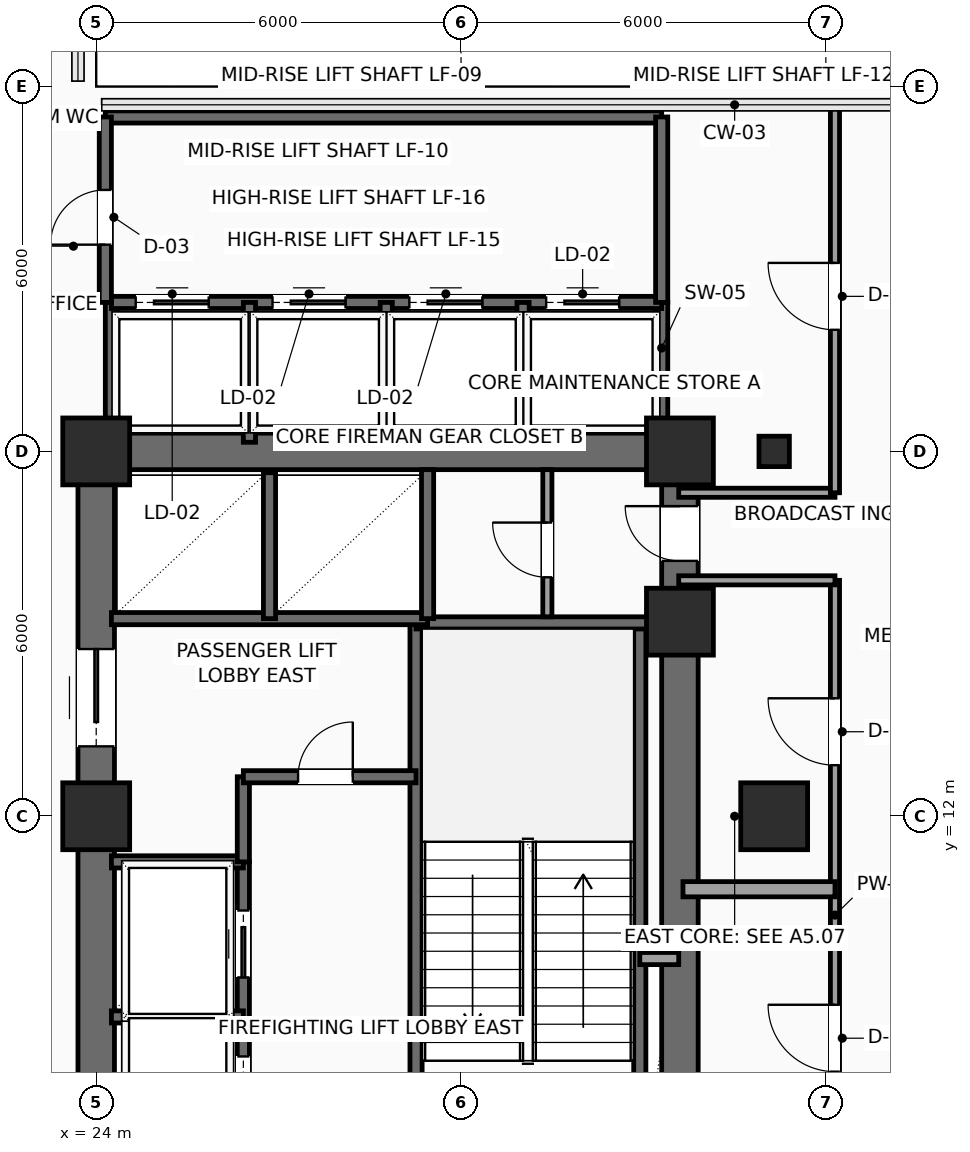
"""IFC4 building model, lengths in metres.
Left out: names, types, materials, properties, quantities, classifications, styles, units other than length and angle.
Written with IfcOpenShell. Run it as: python <this file> out.ifc"""

import sys

from ifc_helpers import new_model, si_unit, direction, frame, frame_2d, origin, origin_2d, place, context, subcontext, project, spatial, rectangle, hollow_rectangle, extrude, element, fill, save


model = new_model("IFC4")
c1 = context("Model", 3, precision=1e-05, world=origin(), true_north=direction((0.0, 1.0)))
c2 = subcontext(c1, "Body", "Model", "MODEL_VIEW")
j1 = project(units=[si_unit("LENGTHUNIT", "METRE"), si_unit("PLANEANGLEUNIT", "RADIAN")], contexts=[c1])
p1 = place(None, origin())
s1 = spatial("IfcSite", under=j1, at=p1, CompositionType="ELEMENT")
p2 = place(p1, origin())
s2 = spatial("IfcBuilding", under=s1, at=p2, CompositionType="ELEMENT")
p3 = place(p2, frame((0.0, 0.0, 130.65)))
s3 = spatial("IfcBuildingStorey", under=s2, at=p3, CompositionType="ELEMENT", Elevation=130.65)
for number, where, z_axis, x_axis in (
    (1, (24.0, 12.0, 0.0), (0.0, 0.0, 1.0), (1.0, 0.0, 0.0)),
    (2, (24.0, 18.0, 0.0), (0.0, 0.0, 1.0), (1.0, 0.0, 0.0)),
    (3, (33.6, 15.2, 0.0), (0.0, 0.0, 1.0), (1.0, 0.0, 0.0)),
    (4, (33.6, 18.0, 0.0), (0.0, 0.0, 1.0), (1.0, 0.0, 0.0)),
    (5, (35.15, 12.0, 0.0), (0.0, 0.0, 1.0), (1.0, 0.0, 0.0)),
):
    element("IfcColumn", number, at=place(p3, frame(where, z_axis=z_axis, x_axis=x_axis)), inside=s3, PredefinedType="COLUMN", context=c2, shape_type="SweptSolid", body=[
        extrude(rectangle(XDim=1.1, YDim=1.1, at=origin_2d()), origin(), (0.0, 0.0, 1.0), 3.75),
    ])
p4 = place(p3, frame((35.15, 18.0, 0.0), z_axis=(0.0, 0.0, 1.0), x_axis=(1.0, 0.0, 0.0)))
e6 = element("IfcColumn", 6, at=p4, inside=s3, PredefinedType="COLUMN", context=c2, shape_type="SweptSolid", body=[
    extrude(hollow_rectangle(XDim=0.5, YDim=0.5, WallThickness=0.025, InnerFilletRadius=0.025, OuterFilletRadius=0.04, at=origin_2d()), origin(), (0.0, 0.0, 1.0), 3.75),
])
p5 = place(p3, frame((24.0, 18.0, 0.0), z_axis=(0.0, 0.0, 1.0), x_axis=(1.0, 0.0, 0.0)))
e7 = element("IfcWall", 7, at=p5, inside=s3, PredefinedType="SHEAR", context=c2, shape_type="SweptSolid", body=[
    extrude(rectangle(XDim=9.6, YDim=0.6, at=frame_2d((4.8, 0.0))), origin(), (0.0, 0.0, 1.0), 3.525),
])
p6 = place(p3, frame((24.0, 6.0, 0.0), z_axis=(0.0, 0.0, 1.0), x_axis=(0.0, 1.0, 0.0)))
e8 = element("IfcWall", 8, at=p6, inside=s3, PredefinedType="SHEAR", context=c2, shape_type="SweptSolid", body=[
    extrude(rectangle(XDim=12.0, YDim=0.6, at=frame_2d((6.0, 0.0))), origin(), (0.0, 0.0, 1.0), 3.525),
])
p7 = place(p6, frame((7.15, 0.0, 0.0)))
e9 = element("IfcOpeningElement", 9, at=p7, cuts=e8, PredefinedType="OPENING", context=c2, shape_type="SweptSolid", body=[
    extrude(rectangle(XDim=1.6, YDim=2.3, at=frame_2d((0.8, 1.15))), frame((0.0, 0.31, 0.0), z_axis=(0.0, -1.0, 0.0), x_axis=(1.0, 0.0, 0.0)), (0.0, 0.0, 1.0), 0.62),
])
p8 = place(p3, frame((33.6, 6.0, 0.0), z_axis=(0.0, 0.0, 1.0), x_axis=(0.0, 1.0, 0.0)))
e10 = element("IfcWall", 10, at=p8, inside=s3, PredefinedType="SHEAR", context=c2, shape_type="SweptSolid", body=[
    extrude(rectangle(XDim=12.0, YDim=0.6, at=frame_2d((6.0, 0.0))), origin(), (0.0, 0.0, 1.0), 3.525),
])
p9 = place(p8, frame((10.2, 0.0, 0.0)))
e11 = element("IfcOpeningElement", 11, at=p9, cuts=e10, PredefinedType="OPENING", context=c2, shape_type="SweptSolid", body=[
    extrude(rectangle(XDim=0.9, YDim=2.15, at=frame_2d((0.45, 1.075))), frame((0.0, 0.31, 0.0), z_axis=(0.0, -1.0, 0.0), x_axis=(1.0, 0.0, 0.0)), (0.0, 0.0, 1.0), 0.62),
])
p10 = place(p3, frame((29.26, 6.3, 0.0), z_axis=(0.0, 0.0, 1.0), x_axis=(0.0, 1.0, 0.0)))
e12 = element("IfcWall", 12, at=p10, inside=s3, PredefinedType="SHEAR", context=c2, shape_type="SweptSolid", body=[
    extrude(rectangle(XDim=8.88, YDim=0.2, at=frame_2d((4.44, 0.0))), origin(), (0.0, 0.0, 1.0), 3.525),
])
p11 = place(p10, frame((0.35, 0.0, 0.0)))
e13 = element("IfcOpeningElement", 13, at=p11, cuts=e12, PredefinedType="OPENING", context=c2, shape_type="SweptSolid", body=[
    extrude(rectangle(XDim=1.1, YDim=2.2, at=frame_2d((0.55, 1.1))), frame((0.0, 0.11, 0.0), z_axis=(0.0, -1.0, 0.0), x_axis=(1.0, 0.0, 0.0)), (0.0, 0.0, 1.0), 0.22),
])
p12 = place(p3, frame((32.94, 6.3, 0.0), z_axis=(0.0, 0.0, 1.0), x_axis=(0.0, 1.0, 0.0)))
e14 = element("IfcWall", 14, at=p12, inside=s3, PredefinedType="SHEAR", context=c2, shape_type="SweptSolid", body=[
    extrude(rectangle(XDim=8.88, YDim=0.2, at=frame_2d((4.44, 0.0))), origin(), (0.0, 0.0, 1.0), 3.525),
])
p13 = place(p3, frame((29.26, 15.18, 0.0), z_axis=(0.0, 0.0, 1.0), x_axis=(1.0, 0.0, 0.0)))
e15 = element("IfcWall", 15, at=p13, inside=s3, PredefinedType="SHEAR", context=c2, shape_type="SweptSolid", body=[
    extrude(rectangle(XDim=4.04, YDim=0.2, at=frame_2d((2.02, 0.0))), origin(), (0.0, 0.0, 1.0), 3.525),
])
p14 = place(p3, frame((26.42, 6.3, 0.0), z_axis=(0.0, 0.0, 1.0), x_axis=(0.0, 1.0, 0.0)))
e16 = element("IfcWall", 16, at=p14, inside=s3, PredefinedType="SHEAR", context=c2, shape_type="SweptSolid", body=[
    extrude(rectangle(XDim=4.95, YDim=0.2, at=frame_2d((2.475, 0.0))), origin(), (0.0, 0.0, 1.0), 3.525),
])
p15 = place(p14, frame((0.65, 0.0, 0.0)))
e17 = element("IfcOpeningElement", 17, at=p15, cuts=e16, PredefinedType="OPENING", context=c2, shape_type="SweptSolid", body=[
    extrude(rectangle(XDim=1.1, YDim=2.2, at=frame_2d((0.55, 1.1))), frame((0.0, 0.11, 0.0), z_axis=(0.0, -1.0, 0.0), x_axis=(1.0, 0.0, 0.0)), (0.0, 0.0, 1.0), 0.22),
])
p16 = place(p14, frame((3.05, 0.0, 0.0)))
e18 = element("IfcOpeningElement", 18, at=p16, cuts=e16, PredefinedType="OPENING", context=c2, shape_type="SweptSolid", body=[
    extrude(rectangle(XDim=1.1, YDim=2.2, at=frame_2d((0.55, 1.1))), frame((0.0, 0.11, 0.0), z_axis=(0.0, -1.0, 0.0), x_axis=(1.0, 0.0, 0.0)), (0.0, 0.0, 1.0), 0.22),
])
for number, where, z_axis, x_axis in (
    (19, (24.25, 8.7, 0.0), (0.0, 0.0, 1.0), (1.0, 0.0, 0.0)),
    (20, (24.25, 11.25, 0.0), (0.0, 0.0, 1.0), (1.0, 0.0, 0.0)),
):
    element("IfcWall", number, at=place(p3, frame(where, z_axis=z_axis, x_axis=x_axis)), inside=s3, PredefinedType="SHEAR", context=c2, shape_type="SweptSolid", body=[
        extrude(rectangle(XDim=2.17, YDim=0.2, at=frame_2d((1.085, 0.0))), origin(), (0.0, 0.0, 1.0), 3.525),
    ])
p17 = place(p3, frame((26.42, 11.25, 0.0), z_axis=(0.0, 0.0, 1.0), x_axis=(0.0, 1.0, 0.0)))
e21 = element("IfcWall", 21, at=p17, inside=s3, PredefinedType="SHEAR", context=c2, shape_type="SweptSolid", body=[
    extrude(rectangle(XDim=1.4, YDim=0.2, at=frame_2d((0.7, 0.0))), origin(), (0.0, 0.0, 1.0), 3.525),
])
p18 = place(p3, frame((26.42, 12.65, 0.0), z_axis=(0.0, 0.0, 1.0), x_axis=(1.0, 0.0, 0.0)))
e22 = element("IfcWall", 22, at=p18, inside=s3, PredefinedType="SHEAR", context=c2, shape_type="SweptSolid", body=[
    extrude(rectangle(XDim=2.84, YDim=0.2, at=frame_2d((1.42, 0.0))), origin(), (0.0, 0.0, 1.0), 3.525),
])
p19 = place(p18, frame((0.9, 0.0, 0.0)))
e23 = element("IfcOpeningElement", 23, at=p19, cuts=e22, PredefinedType="OPENING", context=c2, shape_type="SweptSolid", body=[
    extrude(rectangle(XDim=0.9, YDim=2.15, at=frame_2d((0.45, 1.075))), frame((0.0, 0.11, 0.0), z_axis=(0.0, -1.0, 0.0), x_axis=(1.0, 0.0, 0.0)), (0.0, 0.0, 1.0), 0.22),
])
p20 = place(p3, frame((32.94, 9.66, 0.0), z_axis=(0.0, 0.0, 1.0), x_axis=(1.0, 0.0, 0.0)))
e24 = element("IfcWall", 24, at=p20, inside=s3, PredefinedType="SOLIDWALL", context=c2, shape_type="SweptSolid", body=[
    extrude(rectangle(XDim=0.64, YDim=0.2, at=frame_2d((0.32, 0.0))), origin(), (0.0, 0.0, 1.0), 3.525),
])
p21 = place(p3, frame((24.25, 15.25, 0.0), z_axis=(0.0, 0.0, 1.0), x_axis=(1.0, 0.0, 0.0)))
e25 = element("IfcWall", 25, at=p21, inside=s3, PredefinedType="SHEAR", context=c2, shape_type="SweptSolid", body=[
    extrude(rectangle(XDim=5.2, YDim=0.2, at=frame_2d((2.6, 0.0))), origin(), (0.0, 0.0, 1.0), 3.525),
])
p22 = place(p3, frame((26.85, 15.25, 0.0), z_axis=(0.0, 0.0, 1.0), x_axis=(0.0, 1.0, 0.0)))
e26 = element("IfcWall", 26, at=p22, inside=s3, PredefinedType="SHEAR", context=c2, shape_type="SweptSolid", body=[
    extrude(rectangle(XDim=2.4, YDim=0.2, at=frame_2d((1.2, 0.0))), origin(), (0.0, 0.0, 1.0), 3.525),
])
p23 = place(p3, frame((29.45, 15.25, 0.0), z_axis=(0.0, 0.0, 1.0), x_axis=(0.0, 1.0, 0.0)))
e27 = element("IfcWall", 27, at=p23, inside=s3, PredefinedType="SHEAR", context=c2, shape_type="SweptSolid", body=[
    extrude(rectangle(XDim=2.45, YDim=0.2, at=frame_2d((1.225, 0.0))), origin(), (0.0, 0.0, 1.0), 3.525),
])
p24 = place(p3, frame((31.42, 15.28, 0.0), z_axis=(0.0, 0.0, 1.0), x_axis=(0.0, 1.0, 0.0)))
e28 = element("IfcWall", 28, at=p24, inside=s3, PredefinedType="PARTITIONING", context=c2, shape_type="SweptSolid", body=[
    extrude(rectangle(XDim=2.42, YDim=0.15, at=frame_2d((1.21, 0.0))), origin(), (0.0, 0.0, 1.0), 3.525),
])
p25 = place(p24, frame((0.65, 0.0, 0.0)))
e29 = element("IfcOpeningElement", 29, at=p25, cuts=e28, PredefinedType="OPENING", context=c2, shape_type="SweptSolid", body=[
    extrude(rectangle(XDim=0.9, YDim=2.15, at=frame_2d((0.45, 1.075))), frame((0.0, 0.085, 0.0), z_axis=(0.0, -1.0, 0.0), x_axis=(1.0, 0.0, 0.0)), (0.0, 0.0, 1.0), 0.17),
])
for number, where, z_axis, x_axis in (
    (30, (33.3, 18.1, 0.0), (0.0, 0.0, 1.0), (0.0, 1.0, 0.0)),
    (31, (24.25, 18.1, 0.0), (0.0, 0.0, 1.0), (0.0, 1.0, 0.0)),
):
    element("IfcWall", number, at=place(p3, frame(where, z_axis=z_axis, x_axis=x_axis)), inside=s3, PredefinedType="SHEAR", context=c2, shape_type="SweptSolid", body=[
        extrude(rectangle(XDim=2.35, YDim=0.2, at=frame_2d((1.175, 0.0))), origin(), (0.0, 0.0, 1.0), 3.525),
    ])
p26 = place(p3, frame((24.25, 20.45, 0.0), z_axis=(0.0, 0.0, 1.0), x_axis=(1.0, 0.0, 0.0)))
e32 = element("IfcWall", 32, at=p26, inside=s3, PredefinedType="SHEAR", context=c2, shape_type="SweptSolid", body=[
    extrude(rectangle(XDim=9.05, YDim=0.2, at=frame_2d((4.525, 0.0))), origin(), (0.0, 0.0, 1.0), 3.525),
])
p27 = place(p26, frame((0.4, 0.0, 0.0)))
e33 = element("IfcOpeningElement", 33, at=p27, cuts=e32, PredefinedType="OPENING", context=c2, shape_type="SweptSolid", body=[
    extrude(rectangle(XDim=1.2, YDim=2.2, at=frame_2d((0.6, 1.1))), frame((0.0, 0.11, 0.0), z_axis=(0.0, -1.0, 0.0), x_axis=(1.0, 0.0, 0.0)), (0.0, 0.0, 1.0), 0.22),
])
p28 = place(p26, frame((2.65, 0.0, 0.0)))
e34 = element("IfcOpeningElement", 34, at=p28, cuts=e32, PredefinedType="OPENING", context=c2, shape_type="SweptSolid", body=[
    extrude(rectangle(XDim=1.2, YDim=2.2, at=frame_2d((0.6, 1.1))), frame((0.0, 0.11, 0.0), z_axis=(0.0, -1.0, 0.0), x_axis=(1.0, 0.0, 0.0)), (0.0, 0.0, 1.0), 0.22),
])
p29 = place(p26, frame((4.9, 0.0, 0.0)))
e35 = element("IfcOpeningElement", 35, at=p29, cuts=e32, PredefinedType="OPENING", context=c2, shape_type="SweptSolid", body=[
    extrude(rectangle(XDim=1.2, YDim=2.2, at=frame_2d((0.6, 1.1))), frame((0.0, 0.11, 0.0), z_axis=(0.0, -1.0, 0.0), x_axis=(1.0, 0.0, 0.0)), (0.0, 0.0, 1.0), 0.22),
])
p30 = place(p26, frame((7.15, 0.0, 0.0)))
e36 = element("IfcOpeningElement", 36, at=p30, cuts=e32, PredefinedType="OPENING", context=c2, shape_type="SweptSolid", body=[
    extrude(rectangle(XDim=1.2, YDim=2.2, at=frame_2d((0.6, 1.1))), frame((0.0, 0.11, 0.0), z_axis=(0.0, -1.0, 0.0), x_axis=(1.0, 0.0, 0.0)), (0.0, 0.0, 1.0), 0.22),
])
for number, where, z_axis, x_axis in (
    (37, (26.52, 18.15, 0.0), (0.0, 0.0, 1.0), (0.0, 1.0, 0.0)),
    (38, (28.77, 18.15, 0.0), (0.0, 0.0, 1.0), (0.0, 1.0, 0.0)),
    (39, (31.02, 18.15, 0.0), (0.0, 0.0, 1.0), (0.0, 1.0, 0.0)),
):
    element("IfcWall", number, at=place(p3, frame(where, z_axis=z_axis, x_axis=x_axis)), inside=s3, PredefinedType="SHEAR", context=c2, shape_type="SweptSolid", body=[
        extrude(rectangle(XDim=2.3, YDim=0.2, at=frame_2d((1.15, 0.0))), origin(), (0.0, 0.0, 1.0), 3.525),
    ])
p31 = place(p3, frame((24.15, 23.5, 0.0), z_axis=(0.0, 0.0, 1.0), x_axis=(1.0, 0.0, 0.0)))
e40 = element("IfcWall", 40, at=p31, inside=s3, PredefinedType="SHEAR", context=c2, shape_type="SweptSolid", body=[
    extrude(rectangle(XDim=9.15, YDim=0.2, at=frame_2d((4.575, 0.0))), origin(), (0.0, 0.0, 1.0), 3.525),
])
p32 = place(p3, frame((33.3, 20.45, 0.0), z_axis=(0.0, 0.0, 1.0), x_axis=(0.0, 1.0, 0.0)))
e41 = element("IfcWall", 41, at=p32, inside=s3, PredefinedType="SHEAR", context=c2, shape_type="SweptSolid", body=[
    extrude(rectangle(XDim=3.05, YDim=0.2, at=frame_2d((1.525, 0.0))), origin(), (0.0, 0.0, 1.0), 3.525),
])
p33 = place(p3, frame((24.15, 20.45, 0.0), z_axis=(0.0, 0.0, 1.0), x_axis=(0.0, 1.0, 0.0)))
e42 = element("IfcWall", 42, at=p33, inside=s3, PredefinedType="SHEAR", context=c2, shape_type="SweptSolid", body=[
    extrude(rectangle(XDim=3.05, YDim=0.2, at=frame_2d((1.525, 0.0))), origin(), (0.0, 0.0, 1.0), 3.525),
])
p34 = place(p33, frame((0.95, 0.0, 0.0)))
e43 = element("IfcOpeningElement", 43, at=p34, cuts=e42, PredefinedType="OPENING", context=c2, shape_type="SweptSolid", body=[
    extrude(rectangle(XDim=0.9, YDim=2.15, at=frame_2d((0.45, 1.075))), frame((0.0, 0.11, 0.0), z_axis=(0.0, -1.0, 0.0), x_axis=(1.0, 0.0, 0.0)), (0.0, 0.0, 1.0), 0.22),
])
p35 = place(p3, frame((36.15, 5.8, 0.0), z_axis=(0.0, 0.0, 1.0), x_axis=(0.0, 1.0, 0.0)))
e44 = element("IfcWall", 44, at=p35, inside=s3, PredefinedType="PARTITIONING", context=c2, shape_type="SweptSolid", body=[
    extrude(rectangle(XDim=10.08, YDim=0.15, at=frame_2d((5.04, 0.0))), origin(), (0.0, 0.0, 1.0), 3.525),
])
p36 = place(p35, frame((2.0, 0.0, 0.0)))
e45 = element("IfcOpeningElement", 45, at=p36, cuts=e44, PredefinedType="OPENING", context=c2, shape_type="SweptSolid", body=[
    extrude(rectangle(XDim=1.1, YDim=2.25, at=frame_2d((0.55, 1.125))), frame((0.0, 0.085, 0.0), z_axis=(0.0, -1.0, 0.0), x_axis=(1.0, 0.0, 0.0)), (0.0, 0.0, 1.0), 0.17),
])
p37 = place(p35, frame((7.04, 0.0, 0.0)))
e46 = element("IfcOpeningElement", 46, at=p37, cuts=e44, PredefinedType="OPENING", context=c2, shape_type="SweptSolid", body=[
    extrude(rectangle(XDim=1.1, YDim=2.25, at=frame_2d((0.55, 1.125))), frame((0.0, 0.085, 0.0), z_axis=(0.0, -1.0, 0.0), x_axis=(1.0, 0.0, 0.0)), (0.0, 0.0, 1.0), 0.17),
])
for number, where, z_axis, x_axis in (
    (47, (36.15, 15.88, 0.0), (0.0, 0.0, 1.0), (-1.0, 0.0, 0.0)),
    (48, (33.58, 17.32, 0.0), (0.0, 0.0, 1.0), (1.0, 0.0, 0.0)),
):
    element("IfcWall", number, at=place(p3, frame(where, z_axis=z_axis, x_axis=x_axis)), inside=s3, PredefinedType="PARTITIONING", context=c2, shape_type="SweptSolid", body=[
        extrude(rectangle(XDim=2.57, YDim=0.15, at=frame_2d((1.285, 0.0))), origin(), (0.0, 0.0, 1.0), 3.525),
    ])
p38 = place(p3, frame((36.15, 17.32, 0.0), z_axis=(0.0, 0.0, 1.0), x_axis=(0.0, 1.0, 0.0)))
e49 = element("IfcWall", 49, at=p38, inside=s3, PredefinedType="PARTITIONING", context=c2, shape_type="SweptSolid", body=[
    extrude(rectangle(XDim=6.38, YDim=0.15, at=frame_2d((3.19, 0.0))), origin(), (0.0, 0.0, 1.0), 3.525),
])
p39 = place(p38, frame((2.68, 0.0, 0.0)))
e50 = element("IfcOpeningElement", 50, at=p39, cuts=e49, PredefinedType="OPENING", context=c2, shape_type="SweptSolid", body=[
    extrude(rectangle(XDim=1.1, YDim=2.25, at=frame_2d((0.55, 1.125))), frame((0.0, 0.085, 0.0), z_axis=(0.0, -1.0, 0.0), x_axis=(1.0, 0.0, 0.0)), (0.0, 0.0, 1.0), 0.17),
])
p40 = place(p3, frame((33.65, 10.8, 0.0), z_axis=(0.0, 0.0, 1.0), x_axis=(1.0, 0.0, 0.0)))
e51 = element("IfcWall", 51, at=p40, inside=s3, PredefinedType="PARTITIONING", context=c2, shape_type="SweptSolid", body=[
    extrude(rectangle(XDim=2.5, YDim=0.25, at=frame_2d((1.25, 0.0))), origin(), (0.0, 0.0, 1.0), 3.525),
])
p41 = place(p7, origin())
e52 = element("IfcDoor", 52, at=p41, inside=s3, OperationType="DOUBLE_DOOR_SLIDING", PredefinedType="DOOR", context=c2, shape_type="SweptSolid", body=[
    extrude(rectangle(XDim=1.6, YDim=2.3, at=frame_2d((0.8, 1.15))), frame((0.0, 0.025, 0.0), z_axis=(0.0, -1.0, 0.0), x_axis=(1.0, 0.0, 0.0)), (0.0, 0.0, 1.0), 0.05),
])
fill(e9, e52)
p42 = place(p9, origin())
e53 = element("IfcDoor", 53, at=p42, inside=s3, OperationType="SINGLE_SWING_RIGHT", PredefinedType="DOOR", context=c2, shape_type="SweptSolid", body=[
    extrude(rectangle(XDim=0.9, YDim=2.15, at=frame_2d((0.45, 1.075))), frame((0.0, 0.025, 0.0), z_axis=(0.0, -1.0, 0.0), x_axis=(1.0, 0.0, 0.0)), (0.0, 0.0, 1.0), 0.05),
])
fill(e11, e53)
p43 = place(p15, origin())
e54 = element("IfcDoor", 54, at=p43, inside=s3, OperationType="SLIDING_TO_LEFT", PredefinedType="DOOR", context=c2, shape_type="SweptSolid", body=[
    extrude(rectangle(XDim=1.1, YDim=2.2, at=frame_2d((0.55, 1.1))), frame((0.0, 0.025, 0.0), z_axis=(0.0, -1.0, 0.0), x_axis=(1.0, 0.0, 0.0)), (0.0, 0.0, 1.0), 0.05),
])
fill(e17, e54)
p44 = place(p16, origin())
e55 = element("IfcDoor", 55, at=p44, inside=s3, OperationType="SLIDING_TO_LEFT", PredefinedType="DOOR", context=c2, shape_type="SweptSolid", body=[
    extrude(rectangle(XDim=1.1, YDim=2.2, at=frame_2d((0.55, 1.1))), frame((0.0, 0.025, 0.0), z_axis=(0.0, -1.0, 0.0), x_axis=(1.0, 0.0, 0.0)), (0.0, 0.0, 1.0), 0.05),
])
fill(e18, e55)
p45 = place(p19, origin())
e56 = element("IfcDoor", 56, at=p45, inside=s3, OperationType="SINGLE_SWING_RIGHT", PredefinedType="DOOR", context=c2, shape_type="SweptSolid", body=[
    extrude(rectangle(XDim=0.9, YDim=2.15, at=frame_2d((0.45, 1.075))), frame((0.0, 0.025, 0.0), z_axis=(0.0, -1.0, 0.0), x_axis=(1.0, 0.0, 0.0)), (0.0, 0.0, 1.0), 0.05),
])
fill(e23, e56)
p46 = place(p25, origin())
e57 = element("IfcDoor", 57, at=p46, inside=s3, OperationType="SINGLE_SWING_RIGHT", PredefinedType="DOOR", context=c2, shape_type="SweptSolid", body=[
    extrude(rectangle(XDim=0.9, YDim=2.15, at=frame_2d((0.45, 1.075))), frame((0.0, 0.025, 0.0), z_axis=(0.0, -1.0, 0.0), x_axis=(1.0, 0.0, 0.0)), (0.0, 0.0, 1.0), 0.05),
])
fill(e29, e57)
p47 = place(p27, origin())
e58 = element("IfcDoor", 58, at=p47, inside=s3, OperationType="SLIDING_TO_RIGHT", PredefinedType="DOOR", context=c2, shape_type="SweptSolid", body=[
    extrude(rectangle(XDim=1.2, YDim=2.2, at=frame_2d((0.6, 1.1))), frame((0.0, 0.025, 0.0), z_axis=(0.0, -1.0, 0.0), x_axis=(1.0, 0.0, 0.0)), (0.0, 0.0, 1.0), 0.05),
])
fill(e33, e58)
p48 = place(p28, origin())
e59 = element("IfcDoor", 59, at=p48, inside=s3, OperationType="SLIDING_TO_RIGHT", PredefinedType="DOOR", context=c2, shape_type="SweptSolid", body=[
    extrude(rectangle(XDim=1.2, YDim=2.2, at=frame_2d((0.6, 1.1))), frame((0.0, 0.025, 0.0), z_axis=(0.0, -1.0, 0.0), x_axis=(1.0, 0.0, 0.0)), (0.0, 0.0, 1.0), 0.05),
])
fill(e34, e59)
p49 = place(p29, origin())
e60 = element("IfcDoor", 60, at=p49, inside=s3, OperationType="SLIDING_TO_RIGHT", PredefinedType="DOOR", context=c2, shape_type="SweptSolid", body=[
    extrude(rectangle(XDim=1.2, YDim=2.2, at=frame_2d((0.6, 1.1))), frame((0.0, 0.025, 0.0), z_axis=(0.0, -1.0, 0.0), x_axis=(1.0, 0.0, 0.0)), (0.0, 0.0, 1.0), 0.05),
])
fill(e35, e60)
p50 = place(p30, origin())
e61 = element("IfcDoor", 61, at=p50, inside=s3, OperationType="SLIDING_TO_RIGHT", PredefinedType="DOOR", context=c2, shape_type="SweptSolid", body=[
    extrude(rectangle(XDim=1.2, YDim=2.2, at=frame_2d((0.6, 1.1))), frame((0.0, 0.025, 0.0), z_axis=(0.0, -1.0, 0.0), x_axis=(1.0, 0.0, 0.0)), (0.0, 0.0, 1.0), 0.05),
])
fill(e36, e61)
p51 = place(p34, origin())
e62 = element("IfcDoor", 62, at=p51, inside=s3, OperationType="SINGLE_SWING_LEFT", PredefinedType="DOOR", context=c2, shape_type="SweptSolid", body=[
    extrude(rectangle(XDim=0.9, YDim=2.15, at=frame_2d((0.45, 1.075))), frame((0.0, 0.025, 0.0), z_axis=(0.0, -1.0, 0.0), x_axis=(1.0, 0.0, 0.0)), (0.0, 0.0, 1.0), 0.05),
])
fill(e43, e62)
p52 = place(p36, origin())
e63 = element("IfcDoor", 63, at=p52, inside=s3, OperationType="SINGLE_SWING_RIGHT", PredefinedType="DOOR", context=c2, shape_type="SweptSolid", body=[
    extrude(rectangle(XDim=1.1, YDim=2.25, at=frame_2d((0.55, 1.125))), frame((0.0, 0.025, 0.0), z_axis=(0.0, -1.0, 0.0), x_axis=(1.0, 0.0, 0.0)), (0.0, 0.0, 1.0), 0.05),
])
fill(e45, e63)
p53 = place(p37, origin())
e64 = element("IfcDoor", 64, at=p53, inside=s3, OperationType="SINGLE_SWING_RIGHT", PredefinedType="DOOR", context=c2, shape_type="SweptSolid", body=[
    extrude(rectangle(XDim=1.1, YDim=2.25, at=frame_2d((0.55, 1.125))), frame((0.0, 0.025, 0.0), z_axis=(0.0, -1.0, 0.0), x_axis=(1.0, 0.0, 0.0)), (0.0, 0.0, 1.0), 0.05),
])
fill(e46, e64)
p54 = place(p39, origin())
e65 = element("IfcDoor", 65, at=p54, inside=s3, OperationType="SINGLE_SWING_RIGHT", PredefinedType="DOOR", context=c2, shape_type="SweptSolid", body=[
    extrude(rectangle(XDim=1.1, YDim=2.25, at=frame_2d((0.55, 1.125))), frame((0.0, 0.025, 0.0), z_axis=(0.0, -1.0, 0.0), x_axis=(1.0, 0.0, 0.0)), (0.0, 0.0, 1.0), 0.05),
])
fill(e50, e65)
save(model, sys.argv[1])
